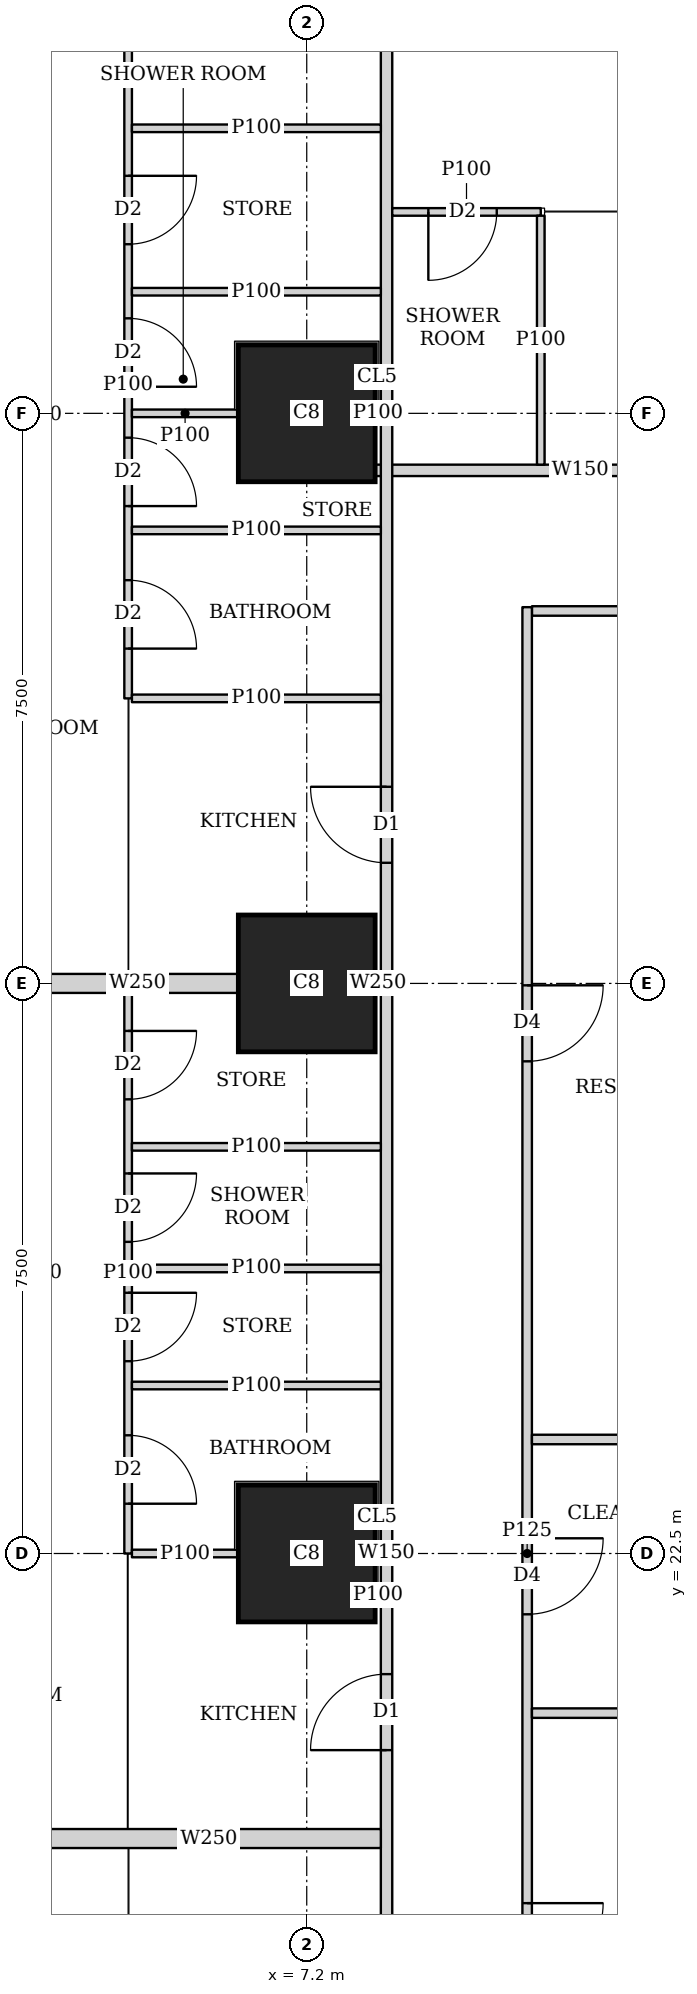
"""IFC4 building model, lengths in metres.
Left out: names, types, materials, properties, quantities, classifications, styles, units other than length and angle.
Written with IfcOpenShell. Run it as: python <this file> out.ifc"""

import sys

from ifc_helpers import new_model, si_unit, direction, frame, frame_2d, origin, origin_2d, place, context, subcontext, project, spatial, rectangle, extrude, element, fill, save


model = new_model("IFC4")
c1 = context("Model", 3, precision=1e-05, world=origin(), true_north=direction((0.0, 1.0)))
c2 = subcontext(c1, "Body", "Model", "MODEL_VIEW")
j1 = project(units=[si_unit("LENGTHUNIT", "METRE"), si_unit("PLANEANGLEUNIT", "RADIAN")], contexts=[c1])
p1 = place(None, origin())
s1 = spatial("IfcSite", under=j1, at=p1, CompositionType="ELEMENT")
p2 = place(p1, origin())
s2 = spatial("IfcBuilding", under=s1, at=p2, CompositionType="ELEMENT")
p3 = place(p2, frame((0.0, 0.0, 31.25)))
s3 = spatial("IfcBuildingStorey", under=s2, at=p3, CompositionType="ELEMENT", Elevation=31.25)
for number, where, z_axis, x_axis in (
    (1, (7.2, 22.5, 0.0), (0.0, 0.0, 1.0), (1.0, 0.0, 0.0)),
    (2, (7.2, 30.0, 0.0), (0.0, 0.0, 1.0), (1.0, 0.0, 0.0)),
    (3, (7.2, 37.5, 0.0), (0.0, 0.0, 1.0), (1.0, 0.0, 0.0)),
):
    element("IfcColumn", number, at=place(p3, frame(where, z_axis=z_axis, x_axis=x_axis)), inside=s3, PredefinedType="COLUMN", context=c2, shape_type="SweptSolid", body=[
        extrude(rectangle(XDim=1.8, YDim=1.8, at=origin_2d()), origin(), (0.0, 0.0, 1.0), 3.75),
    ])
p4 = place(p3, frame((8.25, 2.426, 0.0), z_axis=(0.0, 0.0, 1.0), x_axis=(0.0, 1.0, 0.0)))
e4 = element("IfcWall", 4, at=p4, inside=s3, PredefinedType="SOLIDWALL", context=c2, shape_type="SweptSolid", body=[
    extrude(rectangle(XDim=40.173, YDim=0.15, at=frame_2d((20.086, 0.0))), origin(), (0.0, 0.0, 1.0), 3.5),
])
p5 = place(p4, frame((14.161, 0.0, 0.0)))
e5 = element("IfcOpeningElement", 5, at=p5, cuts=e4, PredefinedType="OPENING", context=c2, shape_type="SweptSolid", body=[
    extrude(rectangle(XDim=1.0, YDim=2.1, at=frame_2d((0.5, 1.05))), frame((0.0, 0.085, 0.0), z_axis=(0.0, -1.0, 0.0), x_axis=(1.0, 0.0, 0.0)), (0.0, 0.0, 1.0), 0.17),
])
p6 = place(p4, frame((17.487, 0.0, 0.0)))
e6 = element("IfcOpeningElement", 6, at=p6, cuts=e4, PredefinedType="OPENING", context=c2, shape_type="SweptSolid", body=[
    extrude(rectangle(XDim=1.0, YDim=2.1, at=frame_2d((0.5, 1.05))), frame((0.0, 0.085, 0.0), z_axis=(0.0, -1.0, 0.0), x_axis=(1.0, 0.0, 0.0)), (0.0, 0.0, 1.0), 0.17),
])
p7 = place(p4, frame((29.161, 0.0, 0.0)))
e7 = element("IfcOpeningElement", 7, at=p7, cuts=e4, PredefinedType="OPENING", context=c2, shape_type="SweptSolid", body=[
    extrude(rectangle(XDim=1.0, YDim=2.1, at=frame_2d((0.5, 1.05))), frame((0.0, 0.085, 0.0), z_axis=(0.0, -1.0, 0.0), x_axis=(1.0, 0.0, 0.0)), (0.0, 0.0, 1.0), 0.17),
])
p8 = place(p3, frame((8.1, 36.75, 0.0), z_axis=(0.0, 0.0, 1.0), x_axis=(1.0, 0.0, 0.0)))
e8 = element("IfcWall", 8, at=p8, inside=s3, PredefinedType="SOLIDWALL", context=c2, shape_type="SweptSolid", body=[
    extrude(rectangle(XDim=5.399, YDim=0.15, at=frame_2d((2.699, 0.0))), origin(), (0.0, 0.0, 1.0), 3.5),
])
p9 = place(p8, frame((3.739, 0.0, 0.0)))
e9 = element("IfcOpeningElement", 9, at=p9, cuts=e8, PredefinedType="OPENING", context=c2, shape_type="SweptSolid", body=[
    extrude(rectangle(XDim=1.0, YDim=2.1, at=frame_2d((0.5, 1.05))), frame((0.0, 0.085, 0.0), z_axis=(0.0, -1.0, 0.0), x_axis=(1.0, 0.0, 0.0)), (0.0, 0.0, 1.0), 0.17),
])
p10 = place(p3, frame((4.85, 22.5, 0.0), z_axis=(0.0, 0.0, 1.0), x_axis=(0.0, 1.0, 0.0)))
e10 = element("IfcWall", 10, at=p10, inside=s3, PredefinedType="PARTITIONING", context=c2, shape_type="SweptSolid", body=[
    extrude(rectangle(XDim=7.375, YDim=0.1, at=frame_2d((3.688, 0.0))), origin(), (0.0, 0.0, 1.0), 3.5),
])
p11 = place(p10, frame((0.655, 0.0, 0.0)))
e11 = element("IfcOpeningElement", 11, at=p11, cuts=e10, PredefinedType="OPENING", context=c2, shape_type="SweptSolid", body=[
    extrude(rectangle(XDim=0.9, YDim=2.1, at=frame_2d((0.45, 1.05))), frame((0.0, 0.06, 0.0), z_axis=(0.0, -1.0, 0.0), x_axis=(1.0, 0.0, 0.0)), (0.0, 0.0, 1.0), 0.12),
])
p12 = place(p10, frame((4.1, 0.0, 0.0)))
e12 = element("IfcOpeningElement", 12, at=p12, cuts=e10, PredefinedType="OPENING", context=c2, shape_type="SweptSolid", body=[
    extrude(rectangle(XDim=0.9, YDim=2.1, at=frame_2d((0.45, 1.05))), frame((0.0, 0.06, 0.0), z_axis=(0.0, -1.0, 0.0), x_axis=(1.0, 0.0, 0.0)), (0.0, 0.0, 1.0), 0.12),
])
p13 = place(p10, frame((2.53, 0.0, 0.0)))
e13 = element("IfcOpeningElement", 13, at=p13, cuts=e10, PredefinedType="OPENING", context=c2, shape_type="SweptSolid", body=[
    extrude(rectangle(XDim=0.9, YDim=2.1, at=frame_2d((0.45, 1.05))), frame((0.0, 0.06, 0.0), z_axis=(0.0, -1.0, 0.0), x_axis=(1.0, 0.0, 0.0)), (0.0, 0.0, 1.0), 0.12),
])
p14 = place(p10, frame((5.975, 0.0, 0.0)))
e14 = element("IfcOpeningElement", 14, at=p14, cuts=e10, PredefinedType="OPENING", context=c2, shape_type="SweptSolid", body=[
    extrude(rectangle(XDim=0.9, YDim=2.1, at=frame_2d((0.45, 1.05))), frame((0.0, 0.06, 0.0), z_axis=(0.0, -1.0, 0.0), x_axis=(1.0, 0.0, 0.0)), (0.0, 0.0, 1.0), 0.12),
])
p15 = place(p3, frame((4.9, 22.5, 0.0), z_axis=(0.0, 0.0, 1.0), x_axis=(1.0, 0.0, 0.0)))
e15 = element("IfcWall", 15, at=p15, inside=s3, PredefinedType="PARTITIONING", context=c2, shape_type="SweptSolid", body=[
    extrude(rectangle(XDim=1.399, YDim=0.1, at=frame_2d((0.7, 0.0))), origin(), (0.0, 0.0, 1.0), 3.5),
])
p16 = place(p3, frame((8.101, 22.5, 0.0), z_axis=(0.0, 0.0, 1.0), x_axis=(1.0, 0.0, 0.0)))
e16 = element("IfcWall", 16, at=p16, inside=s3, PredefinedType="PARTITIONING", context=c2, shape_type="SweptSolid", body=[
    extrude(rectangle(XDim=0.074, YDim=0.1, at=frame_2d((0.037, 0.0))), origin(), (0.0, 0.0, 1.0), 3.5),
])
for number, where, z_axis, x_axis in (
    (17, (4.9, 26.25, 0.0), (0.0, 0.0, 1.0), (1.0, 0.0, 0.0)),
    (18, (4.9, 24.71, 0.0), (0.0, 0.0, 1.0), (1.0, 0.0, 0.0)),
    (19, (4.9, 27.85, 0.0), (0.0, 0.0, 1.0), (1.0, 0.0, 0.0)),
):
    element("IfcWall", number, at=place(p3, frame(where, z_axis=z_axis, x_axis=x_axis)), inside=s3, PredefinedType="PARTITIONING", context=c2, shape_type="SweptSolid", body=[
        extrude(rectangle(XDim=3.275, YDim=0.1, at=frame_2d((1.638, 0.0))), origin(), (0.0, 0.0, 1.0), 3.5),
    ])
p17 = place(p3, frame((3.65, 18.75, 0.0), z_axis=(0.0, 0.0, 1.0), x_axis=(1.0, 0.0, 0.0)))
e20 = element("IfcWall", 20, at=p17, inside=s3, PredefinedType="SOLIDWALL", context=c2, shape_type="SweptSolid", body=[
    extrude(rectangle(XDim=4.525, YDim=0.25, at=frame_2d((2.263, 0.0))), origin(), (0.0, 0.0, 1.0), 3.5),
])
p18 = place(p3, frame((4.85, 33.75, 0.0), z_axis=(0.0, 0.0, 1.0), x_axis=(0.0, 1.0, 0.0)))
e21 = element("IfcWall", 21, at=p18, inside=s3, PredefinedType="PARTITIONING", context=c2, shape_type="SweptSolid", body=[
    extrude(rectangle(XDim=8.244, YDim=0.1, at=frame_2d((4.122, 0.0))), origin(), (0.0, 0.0, 1.0), 3.5),
])
p19 = place(p18, frame((0.655, 0.0, 0.0)))
e22 = element("IfcOpeningElement", 22, at=p19, cuts=e21, PredefinedType="OPENING", context=c2, shape_type="SweptSolid", body=[
    extrude(rectangle(XDim=0.9, YDim=2.1, at=frame_2d((0.45, 1.05))), frame((0.0, 0.06, 0.0), z_axis=(0.0, -1.0, 0.0), x_axis=(1.0, 0.0, 0.0)), (0.0, 0.0, 1.0), 0.12),
])
p20 = place(p18, frame((4.1, 0.0, 0.0)))
e23 = element("IfcOpeningElement", 23, at=p20, cuts=e21, PredefinedType="OPENING", context=c2, shape_type="SweptSolid", body=[
    extrude(rectangle(XDim=0.9, YDim=2.1, at=frame_2d((0.45, 1.05))), frame((0.0, 0.06, 0.0), z_axis=(0.0, -1.0, 0.0), x_axis=(1.0, 0.0, 0.0)), (0.0, 0.0, 1.0), 0.12),
])
p21 = place(p18, frame((2.53, 0.0, 0.0)))
e24 = element("IfcOpeningElement", 24, at=p21, cuts=e21, PredefinedType="OPENING", context=c2, shape_type="SweptSolid", body=[
    extrude(rectangle(XDim=0.9, YDim=2.1, at=frame_2d((0.45, 1.05))), frame((0.0, 0.06, 0.0), z_axis=(0.0, -1.0, 0.0), x_axis=(1.0, 0.0, 0.0)), (0.0, 0.0, 1.0), 0.12),
])
p22 = place(p18, frame((5.975, 0.0, 0.0)))
e25 = element("IfcOpeningElement", 25, at=p22, cuts=e21, PredefinedType="OPENING", context=c2, shape_type="SweptSolid", body=[
    extrude(rectangle(XDim=0.9, YDim=2.1, at=frame_2d((0.45, 1.05))), frame((0.0, 0.06, 0.0), z_axis=(0.0, -1.0, 0.0), x_axis=(1.0, 0.0, 0.0)), (0.0, 0.0, 1.0), 0.12),
])
p23 = place(p3, frame((4.85, 41.994, 0.0), z_axis=(0.0, 0.0, 1.0), x_axis=(0.0, 1.0, 0.0)))
e26 = element("IfcWall", 26, at=p23, inside=s3, PredefinedType="PARTITIONING", context=c2, shape_type="SweptSolid", body=[
    extrude(rectangle(XDim=2.901, YDim=0.1, at=frame_2d((1.451, 0.0))), origin(), (0.0, 0.0, 1.0), 2.05),
])
p24 = place(p3, frame((4.9, 33.75, 0.0), z_axis=(0.0, 0.0, 1.0), x_axis=(1.0, 0.0, 0.0)))
e27 = element("IfcWall", 27, at=p24, inside=s3, PredefinedType="PARTITIONING", context=c2, shape_type="SweptSolid", body=[
    extrude(rectangle(XDim=3.275, YDim=0.1, at=frame_2d((1.638, 0.0))), origin(), (0.0, 0.0, 1.0), 3.5),
])
p25 = place(p3, frame((4.9, 37.5, 0.0), z_axis=(0.0, 0.0, 1.0), x_axis=(1.0, 0.0, 0.0)))
e28 = element("IfcWall", 28, at=p25, inside=s3, PredefinedType="PARTITIONING", context=c2, shape_type="SweptSolid", body=[
    extrude(rectangle(XDim=1.399, YDim=0.1, at=frame_2d((0.7, 0.0))), origin(), (0.0, 0.0, 1.0), 3.5),
])
p26 = place(p3, frame((8.101, 37.5, 0.0), z_axis=(0.0, 0.0, 1.0), x_axis=(1.0, 0.0, 0.0)))
e29 = element("IfcWall", 29, at=p26, inside=s3, PredefinedType="PARTITIONING", context=c2, shape_type="SweptSolid", body=[
    extrude(rectangle(XDim=0.074, YDim=0.1, at=frame_2d((0.037, 0.0))), origin(), (0.0, 0.0, 1.0), 3.5),
])
for number, where, z_axis, x_axis in (
    (30, (4.9, 41.25, 0.0), (0.0, 0.0, 1.0), (1.0, 0.0, 0.0)),
    (31, (4.9, 35.96, 0.0), (0.0, 0.0, 1.0), (1.0, 0.0, 0.0)),
    (32, (4.9, 39.1, 0.0), (0.0, 0.0, 1.0), (1.0, 0.0, 0.0)),
):
    element("IfcWall", number, at=place(p3, frame(where, z_axis=z_axis, x_axis=x_axis)), inside=s3, PredefinedType="PARTITIONING", context=c2, shape_type="SweptSolid", body=[
        extrude(rectangle(XDim=3.275, YDim=0.1, at=frame_2d((1.638, 0.0))), origin(), (0.0, 0.0, 1.0), 3.5),
    ])
p27 = place(p3, frame((3.65, 30.0, 0.0), z_axis=(0.0, 0.0, 1.0), x_axis=(1.0, 0.0, 0.0)))
e33 = element("IfcWall", 33, at=p27, inside=s3, PredefinedType="SOLIDWALL", context=c2, shape_type="SweptSolid", body=[
    extrude(rectangle(XDim=2.649, YDim=0.25, at=frame_2d((1.325, 0.0))), origin(), (0.0, 0.0, 1.0), 3.5),
])
p28 = place(p3, frame((8.101, 30.0, 0.0), z_axis=(0.0, 0.0, 1.0), x_axis=(1.0, 0.0, 0.0)))
e34 = element("IfcWall", 34, at=p28, inside=s3, PredefinedType="SOLIDWALL", context=c2, shape_type="SweptSolid", body=[
    extrude(rectangle(XDim=0.074, YDim=0.25, at=frame_2d((0.037, 0.0))), origin(), (0.0, 0.0, 1.0), 3.5),
])
p29 = place(p3, frame((8.325, 40.15, 0.0), z_axis=(0.0, 0.0, 1.0), x_axis=(1.0, 0.0, 0.0)))
e35 = element("IfcWall", 35, at=p29, inside=s3, PredefinedType="PARTITIONING", context=c2, shape_type="SweptSolid", body=[
    extrude(rectangle(XDim=1.954, YDim=0.1, at=frame_2d((0.977, 0.0))), origin(), (0.0, 0.0, 1.0), 3.5),
])
p30 = place(p29, frame((0.475, 0.0, 0.0)))
e36 = element("IfcOpeningElement", 36, at=p30, cuts=e35, PredefinedType="OPENING", context=c2, shape_type="SweptSolid", body=[
    extrude(rectangle(XDim=0.9, YDim=2.1, at=frame_2d((0.45, 1.05))), frame((0.0, 0.06, 0.0), z_axis=(0.0, -1.0, 0.0), x_axis=(1.0, 0.0, 0.0)), (0.0, 0.0, 1.0), 0.12),
])
p31 = place(p3, frame((10.279, 36.825, 0.0), z_axis=(0.0, 0.0, 1.0), x_axis=(0.0, 1.0, 0.0)))
e37 = element("IfcWall", 37, at=p31, inside=s3, PredefinedType="PARTITIONING", context=c2, shape_type="SweptSolid", body=[
    extrude(rectangle(XDim=3.275, YDim=0.1, at=frame_2d((1.638, 0.0))), origin(), (0.0, 0.0, 1.0), 3.5),
])
p32 = place(p3, frame((10.1, 10.05, 0.0), z_axis=(0.0, 0.0, 1.0), x_axis=(0.0, 1.0, 0.0)))
e38 = element("IfcWall", 38, at=p32, inside=s3, PredefinedType="PARTITIONING", context=c2, shape_type="SweptSolid", body=[
    extrude(rectangle(XDim=24.9, YDim=0.125, at=frame_2d((12.45, 0.0))), origin(), (0.0, 0.0, 1.0), 3.5),
])
p33 = place(p32, frame((1.675, 0.0, 0.0)))
e39 = element("IfcOpeningElement", 39, at=p33, cuts=e38, PredefinedType="OPENING", context=c2, shape_type="SweptSolid", body=[
    extrude(rectangle(XDim=1.0, YDim=2.1, at=frame_2d((0.5, 1.05))), frame((0.0, 0.073, 0.0), z_axis=(0.0, -1.0, 0.0), x_axis=(1.0, 0.0, 0.0)), (0.0, 0.0, 1.0), 0.145),
])
p34 = place(p32, frame((6.85, 0.0, 0.0)))
e40 = element("IfcOpeningElement", 40, at=p34, cuts=e38, PredefinedType="OPENING", context=c2, shape_type="SweptSolid", body=[
    extrude(rectangle(XDim=1.0, YDim=2.1, at=frame_2d((0.5, 1.05))), frame((0.0, 0.073, 0.0), z_axis=(0.0, -1.0, 0.0), x_axis=(1.0, 0.0, 0.0)), (0.0, 0.0, 1.0), 0.145),
])
p35 = place(p32, frame((11.65, 0.0, 0.0)))
e41 = element("IfcOpeningElement", 41, at=p35, cuts=e38, PredefinedType="OPENING", context=c2, shape_type="SweptSolid", body=[
    extrude(rectangle(XDim=1.0, YDim=2.1, at=frame_2d((0.5, 1.05))), frame((0.0, 0.073, 0.0), z_axis=(0.0, -1.0, 0.0), x_axis=(1.0, 0.0, 0.0)), (0.0, 0.0, 1.0), 0.145),
])
p36 = place(p32, frame((18.925, 0.0, 0.0)))
e42 = element("IfcOpeningElement", 42, at=p36, cuts=e38, PredefinedType="OPENING", context=c2, shape_type="SweptSolid", body=[
    extrude(rectangle(XDim=1.0, YDim=2.1, at=frame_2d((0.5, 1.05))), frame((0.0, 0.073, 0.0), z_axis=(0.0, -1.0, 0.0), x_axis=(1.0, 0.0, 0.0)), (0.0, 0.0, 1.0), 0.145),
])
for number, where, z_axis, x_axis in (
    (43, (10.163, 20.4, 0.0), (0.0, 0.0, 1.0), (1.0, 0.0, 0.0)),
    (44, (10.163, 24.0, 0.0), (0.0, 0.0, 1.0), (1.0, 0.0, 0.0)),
):
    element("IfcWall", number, at=place(p3, frame(where, z_axis=z_axis, x_axis=x_axis)), inside=s3, PredefinedType="PARTITIONING", context=c2, shape_type="SweptSolid", body=[
        extrude(rectangle(XDim=3.787, YDim=0.125, at=frame_2d((1.894, 0.0))), origin(), (0.0, 0.0, 1.0), 3.5),
    ])
p37 = place(p3, frame((10.163, 34.9, 0.0), z_axis=(0.0, 0.0, 1.0), x_axis=(1.0, 0.0, 0.0)))
e45 = element("IfcWall", 45, at=p37, inside=s3, PredefinedType="PARTITIONING", context=c2, shape_type="SweptSolid", body=[
    extrude(rectangle(XDim=11.287, YDim=0.125, at=frame_2d((5.644, 0.0))), origin(), (0.0, 0.0, 1.0), 3.5),
])
p38 = place(p37, frame((7.737, 0.0, 0.0)))
e46 = element("IfcOpeningElement", 46, at=p38, cuts=e45, PredefinedType="OPENING", context=c2, shape_type="SweptSolid", body=[
    extrude(rectangle(XDim=1.8, YDim=2.1, at=frame_2d((0.9, 1.05))), frame((0.0, 0.073, 0.0), z_axis=(0.0, -1.0, 0.0), x_axis=(1.0, 0.0, 0.0)), (0.0, 0.0, 1.0), 0.145),
])
p39 = place(p11, origin())
e47 = element("IfcDoor", 47, at=p39, inside=s3, OperationType="SINGLE_SWING_RIGHT", PredefinedType="DOOR", context=c2, shape_type="SweptSolid", body=[
    extrude(rectangle(XDim=0.9, YDim=2.1, at=frame_2d((0.45, 1.05))), frame((0.0, 0.025, 0.0), z_axis=(0.0, -1.0, 0.0), x_axis=(1.0, 0.0, 0.0)), (0.0, 0.0, 1.0), 0.05),
])
fill(e11, e47)
p40 = place(p12, origin())
e48 = element("IfcDoor", 48, at=p40, inside=s3, OperationType="SINGLE_SWING_LEFT", PredefinedType="DOOR", context=c2, shape_type="SweptSolid", body=[
    extrude(rectangle(XDim=0.9, YDim=2.1, at=frame_2d((0.45, 1.05))), frame((0.0, 0.025, 0.0), z_axis=(0.0, -1.0, 0.0), x_axis=(1.0, 0.0, 0.0)), (0.0, 0.0, 1.0), 0.05),
])
fill(e12, e48)
p41 = place(p13, origin())
e49 = element("IfcDoor", 49, at=p41, inside=s3, OperationType="SINGLE_SWING_LEFT", PredefinedType="DOOR", context=c2, shape_type="SweptSolid", body=[
    extrude(rectangle(XDim=0.9, YDim=2.1, at=frame_2d((0.45, 1.05))), frame((0.0, 0.025, 0.0), z_axis=(0.0, -1.0, 0.0), x_axis=(1.0, 0.0, 0.0)), (0.0, 0.0, 1.0), 0.05),
])
fill(e13, e49)
p42 = place(p14, origin())
e50 = element("IfcDoor", 50, at=p42, inside=s3, OperationType="SINGLE_SWING_LEFT", PredefinedType="DOOR", context=c2, shape_type="SweptSolid", body=[
    extrude(rectangle(XDim=0.9, YDim=2.1, at=frame_2d((0.45, 1.05))), frame((0.0, 0.025, 0.0), z_axis=(0.0, -1.0, 0.0), x_axis=(1.0, 0.0, 0.0)), (0.0, 0.0, 1.0), 0.05),
])
fill(e14, e50)
p43 = place(p6, origin())
e51 = element("IfcDoor", 51, at=p43, inside=s3, OperationType="SINGLE_SWING_LEFT", PredefinedType="DOOR", context=c2, shape_type="SweptSolid", body=[
    extrude(rectangle(XDim=1.0, YDim=2.1, at=frame_2d((0.5, 1.05))), frame((0.0, 0.025, 0.0), z_axis=(0.0, -1.0, 0.0), x_axis=(1.0, 0.0, 0.0)), (0.0, 0.0, 1.0), 0.05),
])
fill(e6, e51)
p44 = place(p19, origin())
e52 = element("IfcDoor", 52, at=p44, inside=s3, OperationType="SINGLE_SWING_RIGHT", PredefinedType="DOOR", context=c2, shape_type="SweptSolid", body=[
    extrude(rectangle(XDim=0.9, YDim=2.1, at=frame_2d((0.45, 1.05))), frame((0.0, 0.025, 0.0), z_axis=(0.0, -1.0, 0.0), x_axis=(1.0, 0.0, 0.0)), (0.0, 0.0, 1.0), 0.05),
])
fill(e22, e52)
p45 = place(p20, origin())
e53 = element("IfcDoor", 53, at=p45, inside=s3, OperationType="SINGLE_SWING_RIGHT", PredefinedType="DOOR", context=c2, shape_type="SweptSolid", body=[
    extrude(rectangle(XDim=0.9, YDim=2.1, at=frame_2d((0.45, 1.05))), frame((0.0, 0.025, 0.0), z_axis=(0.0, -1.0, 0.0), x_axis=(1.0, 0.0, 0.0)), (0.0, 0.0, 1.0), 0.05),
])
fill(e23, e53)
p46 = place(p21, origin())
e54 = element("IfcDoor", 54, at=p46, inside=s3, OperationType="SINGLE_SWING_RIGHT", PredefinedType="DOOR", context=c2, shape_type="SweptSolid", body=[
    extrude(rectangle(XDim=0.9, YDim=2.1, at=frame_2d((0.45, 1.05))), frame((0.0, 0.025, 0.0), z_axis=(0.0, -1.0, 0.0), x_axis=(1.0, 0.0, 0.0)), (0.0, 0.0, 1.0), 0.05),
])
fill(e24, e54)
p47 = place(p22, origin())
e55 = element("IfcDoor", 55, at=p47, inside=s3, OperationType="SINGLE_SWING_LEFT", PredefinedType="DOOR", context=c2, shape_type="SweptSolid", body=[
    extrude(rectangle(XDim=0.9, YDim=2.1, at=frame_2d((0.45, 1.05))), frame((0.0, 0.025, 0.0), z_axis=(0.0, -1.0, 0.0), x_axis=(1.0, 0.0, 0.0)), (0.0, 0.0, 1.0), 0.05),
])
fill(e25, e55)
p48 = place(p7, origin())
e56 = element("IfcDoor", 56, at=p48, inside=s3, OperationType="SINGLE_SWING_RIGHT", PredefinedType="DOOR", context=c2, shape_type="SweptSolid", body=[
    extrude(rectangle(XDim=1.0, YDim=2.1, at=frame_2d((0.5, 1.05))), frame((0.0, 0.025, 0.0), z_axis=(0.0, -1.0, 0.0), x_axis=(1.0, 0.0, 0.0)), (0.0, 0.0, 1.0), 0.05),
])
fill(e7, e56)
p49 = place(p30, origin())
e57 = element("IfcDoor", 57, at=p49, inside=s3, OperationType="SINGLE_SWING_RIGHT", PredefinedType="DOOR", context=c2, shape_type="SweptSolid", body=[
    extrude(rectangle(XDim=0.9, YDim=2.1, at=frame_2d((0.45, 1.05))), frame((0.0, 0.025, 0.0), z_axis=(0.0, -1.0, 0.0), x_axis=(1.0, 0.0, 0.0)), (0.0, 0.0, 1.0), 0.05),
])
fill(e36, e57)
p50 = place(p34, origin())
e58 = element("IfcDoor", 58, at=p50, inside=s3, OperationType="SINGLE_SWING_LEFT", PredefinedType="DOOR", context=c2, shape_type="SweptSolid", body=[
    extrude(rectangle(XDim=1.0, YDim=2.1, at=frame_2d((0.5, 1.05))), frame((0.0, 0.025, 0.0), z_axis=(0.0, -1.0, 0.0), x_axis=(1.0, 0.0, 0.0)), (0.0, 0.0, 1.0), 0.05),
])
fill(e40, e58)
p51 = place(p35, origin())
e59 = element("IfcDoor", 59, at=p51, inside=s3, OperationType="SINGLE_SWING_LEFT", PredefinedType="DOOR", context=c2, shape_type="SweptSolid", body=[
    extrude(rectangle(XDim=1.0, YDim=2.1, at=frame_2d((0.5, 1.05))), frame((0.0, 0.025, 0.0), z_axis=(0.0, -1.0, 0.0), x_axis=(1.0, 0.0, 0.0)), (0.0, 0.0, 1.0), 0.05),
])
fill(e41, e59)
p52 = place(p36, origin())
e60 = element("IfcDoor", 60, at=p52, inside=s3, OperationType="SINGLE_SWING_LEFT", PredefinedType="DOOR", context=c2, shape_type="SweptSolid", body=[
    extrude(rectangle(XDim=1.0, YDim=2.1, at=frame_2d((0.5, 1.05))), frame((0.0, 0.025, 0.0), z_axis=(0.0, -1.0, 0.0), x_axis=(1.0, 0.0, 0.0)), (0.0, 0.0, 1.0), 0.05),
])
fill(e42, e60)
save(model, sys.argv[1])
